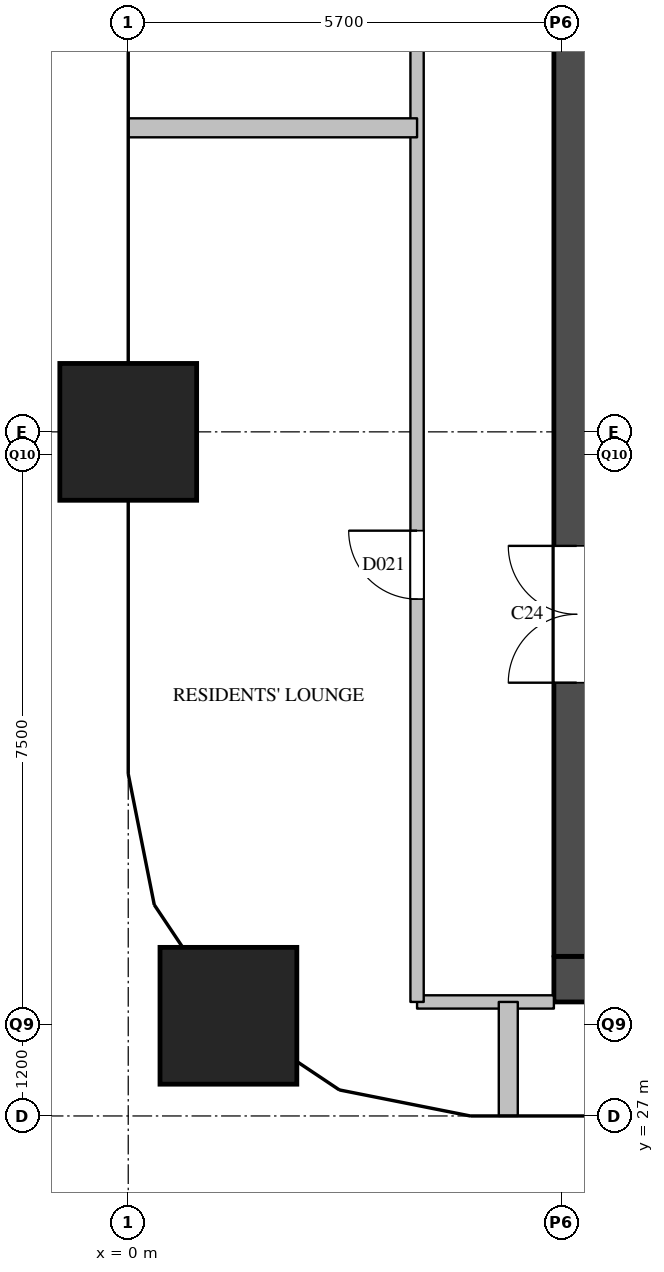
"""IFC4 building model, lengths in metres.
Left out: names, types, materials, properties, quantities, classifications, styles, units other than length and angle.
Written with IfcOpenShell. Run it as: python <this file> out.ifc"""

import sys

from ifc_helpers import new_model, si_unit, direction, frame, frame_2d, origin, origin_2d, place, context, subcontext, project, spatial, rectangle, extrude, element, fill, save


model = new_model("IFC4")
c1 = context("Model", 3, precision=1e-05, world=origin(), true_north=direction((0.0, 1.0)))
c2 = subcontext(c1, "Body", "Model", "MODEL_VIEW")
j1 = project(units=[si_unit("LENGTHUNIT", "METRE"), si_unit("PLANEANGLEUNIT", "RADIAN")], contexts=[c1])
p1 = place(None, origin())
s1 = spatial("IfcSite", under=j1, at=p1, CompositionType="ELEMENT")
p2 = place(p1, origin())
s2 = spatial("IfcBuilding", under=s1, at=p2, CompositionType="ELEMENT")
p3 = place(p2, frame((0.0, 0.0, 119.6)))
s3 = spatial("IfcBuildingStorey", under=s2, at=p3, CompositionType="ELEMENT", Elevation=119.6)
for number, where, z_axis, x_axis in (
    (1, (1.318, 28.318, 0.0), (0.0, 0.0, 1.0), (1.0, 0.0, 0.0)),
    (2, (0.0, 36.0, 0.0), (0.0, 0.0, 1.0), (1.0, 0.0, 0.0)),
):
    element("IfcColumn", number, at=place(p3, frame(where, z_axis=z_axis, x_axis=x_axis)), inside=s3, PredefinedType="COLUMN", context=c2, shape_type="SweptSolid", body=[
        extrude(rectangle(XDim=1.8, YDim=1.8, at=origin_2d()), origin(), (0.0, 0.0, 1.0), 3.8),
    ])
p4 = place(p3, frame((5.6, 28.8, 0.0), z_axis=(0.0, 0.0, 1.0), x_axis=(1.0, 0.0, 0.0)))
e3 = element("IfcWall", 3, at=p4, inside=s3, PredefinedType="SHEAR", context=c2, shape_type="SweptSolid", body=[
    extrude(rectangle(XDim=12.4, YDim=0.6, at=frame_2d((6.2, 0.0))), origin(), (0.0, 0.0, 1.0), 3.3),
])
p5 = place(p4, frame((1.05, 0.0, 0.0)))
e4 = element("IfcOpeningElement", 4, at=p5, cuts=e3, PredefinedType="OPENING", context=c2, shape_type="SweptSolid", body=[
    extrude(rectangle(XDim=1.2, YDim=2.1, at=frame_2d((0.6, 1.05))), frame((0.0, 0.31, 0.0), z_axis=(0.0, -1.0, 0.0), x_axis=(1.0, 0.0, 0.0)), (0.0, 0.0, 1.0), 0.62),
])
p6 = place(p4, frame((5.25, 0.0, 0.0)))
e5 = element("IfcOpeningElement", 5, at=p6, cuts=e3, PredefinedType="OPENING", context=c2, shape_type="SweptSolid", body=[
    extrude(rectangle(XDim=1.2, YDim=2.1, at=frame_2d((0.6, 1.05))), frame((0.0, 0.31, 0.0), z_axis=(0.0, -1.0, 0.0), x_axis=(1.0, 0.0, 0.0)), (0.0, 0.0, 1.0), 0.62),
])
p7 = place(p4, frame((7.35, 0.0, 0.0)))
e6 = element("IfcOpeningElement", 6, at=p7, cuts=e3, PredefinedType="OPENING", context=c2, shape_type="SweptSolid", body=[
    extrude(rectangle(XDim=1.2, YDim=2.1, at=frame_2d((0.6, 1.05))), frame((0.0, 0.31, 0.0), z_axis=(0.0, -1.0, 0.0), x_axis=(1.0, 0.0, 0.0)), (0.0, 0.0, 1.0), 0.62),
])
p8 = place(p3, frame((5.9, 29.1, 0.0), z_axis=(0.0, 0.0, 1.0), x_axis=(0.0, 1.0, 0.0)))
e7 = element("IfcWall", 7, at=p8, inside=s3, PredefinedType="SHEAR", context=c2, shape_type="SweptSolid", body=[
    extrude(rectangle(XDim=20.3, YDim=0.6, at=frame_2d((10.15, 0.0))), origin(), (0.0, 0.0, 1.0), 3.3),
])
p9 = place(p8, frame((3.6, 0.0, 0.0)))
e8 = element("IfcOpeningElement", 8, at=p9, cuts=e7, PredefinedType="OPENING", context=c2, shape_type="SweptSolid", body=[
    extrude(rectangle(XDim=1.8, YDim=2.1, at=frame_2d((0.9, 1.05))), frame((0.0, 0.31, 0.0), z_axis=(0.0, -1.0, 0.0), x_axis=(1.0, 0.0, 0.0)), (0.0, 0.0, 1.0), 0.62),
])
p10 = place(p8, frame((16.4, 0.0, 0.0)))
e9 = element("IfcOpeningElement", 9, at=p10, cuts=e7, PredefinedType="OPENING", context=c2, shape_type="SweptSolid", body=[
    extrude(rectangle(XDim=1.0, YDim=2.1, at=frame_2d((0.5, 1.05))), frame((0.0, 0.31, 0.0), z_axis=(0.0, -1.0, 0.0), x_axis=(1.0, 0.0, 0.0)), (0.0, 0.0, 1.0), 0.62),
])
p11 = place(p3, frame((3.8, 28.5, 0.0), z_axis=(0.0, 0.0, 1.0), x_axis=(1.0, 0.0, 0.0)))
e10 = element("IfcWall", 10, at=p11, inside=s3, PredefinedType="PARTITIONING", context=c2, shape_type="SweptSolid", body=[
    extrude(rectangle(XDim=1.8, YDim=0.175, at=frame_2d((0.9, 0.0))), origin(), (0.0, 0.0, 1.0), 3.3),
])
p12 = place(p3, frame((3.8, 28.5, 0.0), z_axis=(0.0, 0.0, 1.0), x_axis=(0.0, 1.0, 0.0)))
e11 = element("IfcWall", 11, at=p12, inside=s3, PredefinedType="PARTITIONING", context=c2, shape_type="SweptSolid", body=[
    extrude(rectangle(XDim=23.3, YDim=0.175, at=frame_2d((11.65, 0.0))), origin(), (0.0, 0.0, 1.0), 3.3),
])
p13 = place(p12, frame((5.3, 0.0, 0.0)))
e12 = element("IfcOpeningElement", 12, at=p13, cuts=e11, PredefinedType="OPENING", context=c2, shape_type="SweptSolid", body=[
    extrude(rectangle(XDim=0.9, YDim=2.1, at=frame_2d((0.45, 1.05))), frame((0.0, 0.097, 0.0), z_axis=(0.0, -1.0, 0.0), x_axis=(1.0, 0.0, 0.0)), (0.0, 0.0, 1.0), 0.195),
])
p14 = place(p12, frame((13.55, 0.0, 0.0)))
e13 = element("IfcOpeningElement", 13, at=p14, cuts=e11, PredefinedType="OPENING", context=c2, shape_type="SweptSolid", body=[
    extrude(rectangle(XDim=0.9, YDim=2.1, at=frame_2d((0.45, 1.05))), frame((0.0, 0.097, 0.0), z_axis=(0.0, -1.0, 0.0), x_axis=(1.0, 0.0, 0.0)), (0.0, 0.0, 1.0), 0.195),
])
p15 = place(p12, frame((19.45, 0.0, 0.0)))
e14 = element("IfcOpeningElement", 14, at=p15, cuts=e11, PredefinedType="OPENING", context=c2, shape_type="SweptSolid", body=[
    extrude(rectangle(XDim=0.9, YDim=2.1, at=frame_2d((0.45, 1.05))), frame((0.0, 0.097, 0.0), z_axis=(0.0, -1.0, 0.0), x_axis=(1.0, 0.0, 0.0)), (0.0, 0.0, 1.0), 0.195),
])
p16 = place(p3, frame((0.0, 40.0, 0.0), z_axis=(0.0, 0.0, 1.0), x_axis=(1.0, 0.0, 0.0)))
e15 = element("IfcWall", 15, at=p16, inside=s3, PredefinedType="PARTITIONING", context=c2, shape_type="SweptSolid", body=[
    extrude(rectangle(XDim=3.8, YDim=0.25, at=frame_2d((1.9, 0.0))), origin(), (0.0, 0.0, 1.0), 2.3),
])
p17 = place(p3, frame((5.0, 27.0, 0.0), z_axis=(0.0, 0.0, 1.0), x_axis=(0.0, 1.0, 0.0)))
e16 = element("IfcWall", 16, at=p17, inside=s3, PredefinedType="PARTITIONING", context=c2, shape_type="SweptSolid", body=[
    extrude(rectangle(XDim=1.5, YDim=0.25, at=frame_2d((0.75, 0.0))), origin(), (0.0, 0.0, 1.0), 2.3),
])
p18 = place(p9, origin())
e17 = element("IfcDoor", 17, at=p18, inside=s3, OperationType="DOUBLE_DOOR_SINGLE_SWING", PredefinedType="DOOR", context=c2, shape_type="SweptSolid", body=[
    extrude(rectangle(XDim=1.8, YDim=2.1, at=frame_2d((0.9, 1.05))), frame((0.0, 0.025, 0.0), z_axis=(0.0, -1.0, 0.0), x_axis=(1.0, 0.0, 0.0)), (0.0, 0.0, 1.0), 0.05),
])
fill(e8, e17)
p19 = place(p13, origin())
e18 = element("IfcDoor", 18, at=p19, inside=s3, OperationType="SINGLE_SWING_RIGHT", PredefinedType="DOOR", context=c2, shape_type="SweptSolid", body=[
    extrude(rectangle(XDim=0.9, YDim=2.1, at=frame_2d((0.45, 1.05))), frame((0.0, 0.025, 0.0), z_axis=(0.0, -1.0, 0.0), x_axis=(1.0, 0.0, 0.0)), (0.0, 0.0, 1.0), 0.05),
])
fill(e12, e18)
save(model, sys.argv[1])
